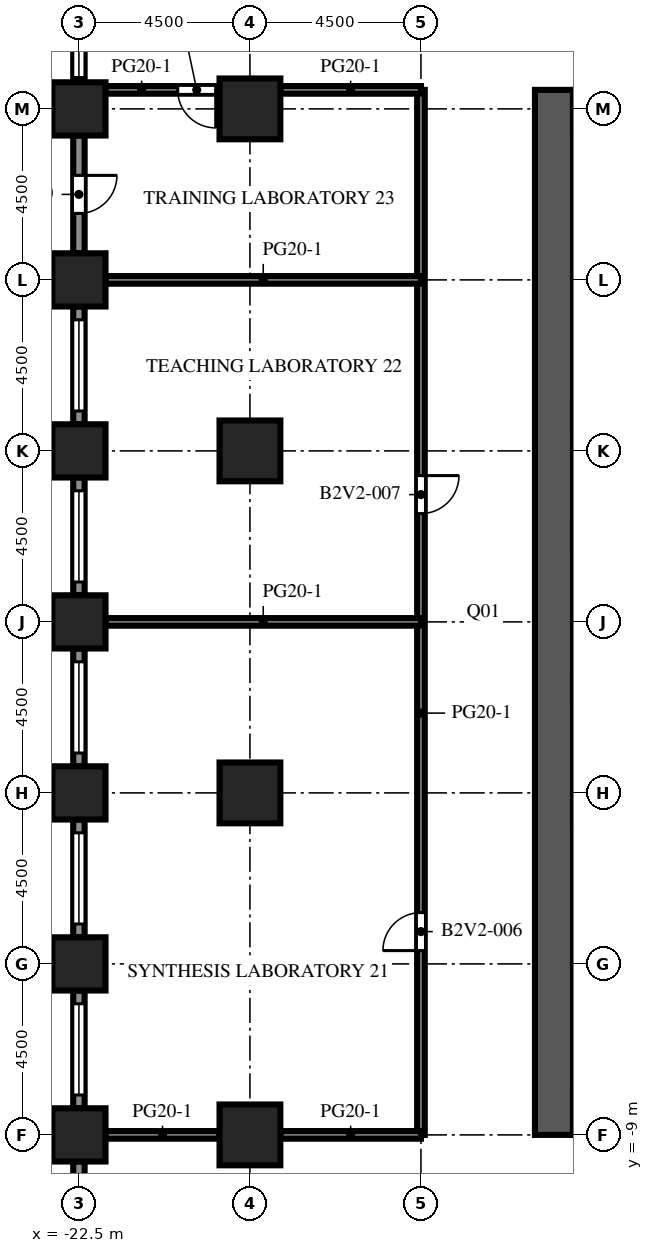
"""IFC4 building model, lengths in metres.
Left out: names, types, materials, properties, quantities, classifications, styles, units other than length and angle.
Written with IfcOpenShell. Run it as: python <this file> out.ifc"""

import sys

from ifc_helpers import new_model, si_unit, direction, frame, frame_2d, origin, origin_2d, place, context, subcontext, project, spatial, rectangle, extrude, element, fill, save


model = new_model("IFC4")
c1 = context("Model", 3, precision=1e-05, world=origin(), true_north=direction((0.0, 1.0)))
c2 = subcontext(c1, "Body", "Model", "MODEL_VIEW")
j1 = project(units=[si_unit("LENGTHUNIT", "METRE"), si_unit("PLANEANGLEUNIT", "RADIAN")], contexts=[c1])
p1 = place(None, origin())
s1 = spatial("IfcSite", under=j1, at=p1, CompositionType="ELEMENT")
p2 = place(p1, origin())
s2 = spatial("IfcBuilding", under=s1, at=p2, CompositionType="ELEMENT")
p3 = place(p2, frame((0.0, 0.0, 62.4)))
s3 = spatial("IfcBuildingStorey", under=s2, at=p3, CompositionType="ELEMENT", Elevation=62.4)
for number, where, z_axis, x_axis in (
    (1, (-22.5, -9.0, 0.0), (0.0, 0.0, 1.0), (1.0, 0.0, 0.0)),
    (2, (-22.5, -4.5, 0.0), (0.0, 0.0, 1.0), (1.0, 0.0, 0.0)),
    (3, (-22.5, 0.0, 0.0), (0.0, 0.0, 1.0), (1.0, 0.0, 0.0)),
    (4, (-22.5, 4.5, 0.0), (0.0, 0.0, 1.0), (1.0, 0.0, 0.0)),
    (5, (-22.5, 9.0, 0.0), (0.0, 0.0, 1.0), (1.0, 0.0, 0.0)),
    (6, (-22.5, 13.5, 0.0), (0.0, 0.0, 1.0), (1.0, 0.0, 0.0)),
    (7, (-22.5, 18.0, 0.0), (0.0, 0.0, 1.0), (1.0, 0.0, 0.0)),
):
    element("IfcColumn", number, at=place(p3, frame(where, z_axis=z_axis, x_axis=x_axis)), inside=s3, PredefinedType="COLUMN", context=c2, shape_type="SweptSolid", body=[
        extrude(rectangle(XDim=1.4, YDim=1.4, at=origin_2d()), origin(), (0.0, 0.0, 1.0), 4.1),
    ])
for number, where, z_axis, x_axis in (
    (8, (-18.0, -9.0, 0.0), (0.0, 0.0, 1.0), (1.0, 0.0, 0.0)),
    (9, (-18.0, 0.0, 0.0), (0.0, 0.0, 1.0), (1.0, 0.0, 0.0)),
    (10, (-18.0, 9.0, 0.0), (0.0, 0.0, 1.0), (1.0, 0.0, 0.0)),
    (11, (-18.0, 18.0, 0.0), (0.0, 0.0, 1.0), (1.0, 0.0, 0.0)),
):
    element("IfcColumn", number, at=place(p3, frame(where, z_axis=z_axis, x_axis=x_axis)), inside=s3, PredefinedType="COLUMN", context=c2, shape_type="SweptSolid", body=[
        extrude(rectangle(XDim=1.6, YDim=1.6, at=origin_2d()), origin(), (0.0, 0.0, 1.0), 4.1),
    ])
p4 = place(p3, frame((-10.0, -9.0, 0.0), z_axis=(0.0, 0.0, 1.0), x_axis=(0.0, 1.0, 0.0)))
e12 = element("IfcWall", 12, at=p4, inside=s3, PredefinedType="SHEAR", context=c2, shape_type="SweptSolid", body=[
    extrude(rectangle(XDim=27.5, YDim=1.0, at=frame_2d((13.75, 0.0))), origin(), (0.0, 0.0, 1.0), 4.1),
])
p5 = place(p4, frame((12.55, 0.0, 0.0)))
e13 = element("IfcOpeningElement", 13, at=p5, cuts=e12, PredefinedType="OPENING", context=c2, shape_type="SweptSolid", body=[
    extrude(rectangle(XDim=2.4, YDim=2.4, at=frame_2d((1.2, 1.2))), frame((0.0, 0.51, 0.0), z_axis=(0.0, -1.0, 0.0), x_axis=(1.0, 0.0, 0.0)), (0.0, 0.0, 1.0), 1.02),
])
p6 = place(p4, frame((6.825, 0.0, 0.0)))
e14 = element("IfcOpeningElement", 14, at=p6, cuts=e12, PredefinedType="OPENING", context=c2, shape_type="SweptSolid", body=[
    extrude(rectangle(XDim=1.2, YDim=2.1, at=frame_2d((0.6, 1.05))), frame((0.0, 0.51, 0.0), z_axis=(0.0, -1.0, 0.0), x_axis=(1.0, 0.0, 0.0)), (0.0, 0.0, 1.0), 1.02),
])
p7 = place(p4, frame((19.475, 0.0, 0.0)))
e15 = element("IfcOpeningElement", 15, at=p7, cuts=e12, PredefinedType="OPENING", context=c2, shape_type="SweptSolid", body=[
    extrude(rectangle(XDim=1.2, YDim=2.1, at=frame_2d((0.6, 1.05))), frame((0.0, 0.51, 0.0), z_axis=(0.0, -1.0, 0.0), x_axis=(1.0, 0.0, 0.0)), (0.0, 0.0, 1.0), 1.02),
])
p8 = place(p3, frame((-22.5, 18.7, 0.0), z_axis=(0.0, 0.0, 1.0), x_axis=(0.0, 1.0, 0.0)))
e16 = element("IfcWall", 16, at=p8, inside=s3, PredefinedType="SOLIDWALL", context=c2, shape_type="SweptSolid", body=[
    extrude(rectangle(XDim=3.1, YDim=0.3, at=frame_2d((1.55, 0.0))), origin(), (0.0, 0.0, 1.0), 2.75),
])
p9 = place(p8, frame((0.125, 0.0, 0.8)))
e17 = element("IfcOpeningElement", 17, at=p9, cuts=e16, PredefinedType="OPENING", context=c2, shape_type="SweptSolid", body=[
    extrude(rectangle(XDim=2.4, YDim=1.7, at=frame_2d((1.2, 0.85))), frame((0.0, 0.16, 0.0), z_axis=(0.0, -1.0, 0.0), x_axis=(1.0, 0.0, 0.0)), (0.0, 0.0, 1.0), 0.32),
])
p10 = place(p3, frame((-22.5, 14.2, 0.0), z_axis=(0.0, 0.0, 1.0), x_axis=(0.0, 1.0, 0.0)))
e18 = element("IfcWall", 18, at=p10, inside=s3, PredefinedType="SOLIDWALL", context=c2, shape_type="SweptSolid", body=[
    extrude(rectangle(XDim=3.1, YDim=0.3, at=frame_2d((1.55, 0.0))), origin(), (0.0, 0.0, 1.0), 2.75),
])
p11 = place(p10, frame((1.05, 0.0, 0.0)))
e19 = element("IfcOpeningElement", 19, at=p11, cuts=e18, PredefinedType="OPENING", context=c2, shape_type="SweptSolid", body=[
    extrude(rectangle(XDim=1.0, YDim=2.2, at=frame_2d((0.5, 1.1))), frame((0.0, 0.16, 0.0), z_axis=(0.0, -1.0, 0.0), x_axis=(1.0, 0.0, 0.0)), (0.0, 0.0, 1.0), 0.32),
])
p12 = place(p3, frame((-22.5, 9.7, 0.0), z_axis=(0.0, 0.0, 1.0), x_axis=(0.0, 1.0, 0.0)))
e20 = element("IfcWall", 20, at=p12, inside=s3, PredefinedType="SOLIDWALL", context=c2, shape_type="SweptSolid", body=[
    extrude(rectangle(XDim=3.1, YDim=0.3, at=frame_2d((1.55, 0.0))), origin(), (0.0, 0.0, 1.0), 2.75),
])
p13 = place(p12, frame((0.35, 0.0, 0.8)))
e21 = element("IfcOpeningElement", 21, at=p13, cuts=e20, PredefinedType="OPENING", context=c2, shape_type="SweptSolid", body=[
    extrude(rectangle(XDim=2.4, YDim=1.7, at=frame_2d((1.2, 0.85))), frame((0.0, 0.16, 0.0), z_axis=(0.0, -1.0, 0.0), x_axis=(1.0, 0.0, 0.0)), (0.0, 0.0, 1.0), 0.32),
])
p14 = place(p3, frame((-22.5, 5.2, 0.0), z_axis=(0.0, 0.0, 1.0), x_axis=(0.0, 1.0, 0.0)))
e22 = element("IfcWall", 22, at=p14, inside=s3, PredefinedType="SOLIDWALL", context=c2, shape_type="SweptSolid", body=[
    extrude(rectangle(XDim=3.1, YDim=0.3, at=frame_2d((1.55, 0.0))), origin(), (0.0, 0.0, 1.0), 2.75),
])
p15 = place(p14, frame((0.35, 0.0, 0.8)))
e23 = element("IfcOpeningElement", 23, at=p15, cuts=e22, PredefinedType="OPENING", context=c2, shape_type="SweptSolid", body=[
    extrude(rectangle(XDim=2.4, YDim=1.7, at=frame_2d((1.2, 0.85))), frame((0.0, 0.16, 0.0), z_axis=(0.0, -1.0, 0.0), x_axis=(1.0, 0.0, 0.0)), (0.0, 0.0, 1.0), 0.32),
])
p16 = place(p3, frame((-22.5, 0.7, 0.0), z_axis=(0.0, 0.0, 1.0), x_axis=(0.0, 1.0, 0.0)))
e24 = element("IfcWall", 24, at=p16, inside=s3, PredefinedType="SOLIDWALL", context=c2, shape_type="SweptSolid", body=[
    extrude(rectangle(XDim=3.1, YDim=0.3, at=frame_2d((1.55, 0.0))), origin(), (0.0, 0.0, 1.0), 2.75),
])
p17 = place(p16, frame((0.35, 0.0, 0.8)))
e25 = element("IfcOpeningElement", 25, at=p17, cuts=e24, PredefinedType="OPENING", context=c2, shape_type="SweptSolid", body=[
    extrude(rectangle(XDim=2.4, YDim=1.7, at=frame_2d((1.2, 0.85))), frame((0.0, 0.16, 0.0), z_axis=(0.0, -1.0, 0.0), x_axis=(1.0, 0.0, 0.0)), (0.0, 0.0, 1.0), 0.32),
])
p18 = place(p3, frame((-22.5, -3.8, 0.0), z_axis=(0.0, 0.0, 1.0), x_axis=(0.0, 1.0, 0.0)))
e26 = element("IfcWall", 26, at=p18, inside=s3, PredefinedType="SOLIDWALL", context=c2, shape_type="SweptSolid", body=[
    extrude(rectangle(XDim=3.1, YDim=0.3, at=frame_2d((1.55, 0.0))), origin(), (0.0, 0.0, 1.0), 2.75),
])
p19 = place(p18, frame((0.35, 0.0, 0.8)))
e27 = element("IfcOpeningElement", 27, at=p19, cuts=e26, PredefinedType="OPENING", context=c2, shape_type="SweptSolid", body=[
    extrude(rectangle(XDim=2.4, YDim=1.7, at=frame_2d((1.2, 0.85))), frame((0.0, 0.16, 0.0), z_axis=(0.0, -1.0, 0.0), x_axis=(1.0, 0.0, 0.0)), (0.0, 0.0, 1.0), 0.32),
])
p20 = place(p3, frame((-22.5, -8.3, 0.0), z_axis=(0.0, 0.0, 1.0), x_axis=(0.0, 1.0, 0.0)))
e28 = element("IfcWall", 28, at=p20, inside=s3, PredefinedType="SOLIDWALL", context=c2, shape_type="SweptSolid", body=[
    extrude(rectangle(XDim=3.1, YDim=0.3, at=frame_2d((1.55, 0.0))), origin(), (0.0, 0.0, 1.0), 2.75),
])
p21 = place(p20, frame((0.35, 0.0, 0.8)))
e29 = element("IfcOpeningElement", 29, at=p21, cuts=e28, PredefinedType="OPENING", context=c2, shape_type="SweptSolid", body=[
    extrude(rectangle(XDim=2.4, YDim=1.7, at=frame_2d((1.2, 0.85))), frame((0.0, 0.16, 0.0), z_axis=(0.0, -1.0, 0.0), x_axis=(1.0, 0.0, 0.0)), (0.0, 0.0, 1.0), 0.32),
])
p22 = place(p3, frame((-22.5, -12.8, 0.0), z_axis=(0.0, 0.0, 1.0), x_axis=(0.0, 1.0, 0.0)))
e30 = element("IfcWall", 30, at=p22, inside=s3, PredefinedType="SOLIDWALL", context=c2, shape_type="SweptSolid", body=[
    extrude(rectangle(XDim=3.1, YDim=0.3, at=frame_2d((1.55, 0.0))), origin(), (0.0, 0.0, 1.0), 2.75),
])
p23 = place(p22, frame((1.425, 0.0, 0.8)))
e31 = element("IfcOpeningElement", 31, at=p23, cuts=e30, PredefinedType="OPENING", context=c2, shape_type="SweptSolid", body=[
    extrude(rectangle(XDim=1.2, YDim=1.7, at=frame_2d((0.6, 0.85))), frame((0.0, 0.16, 0.0), z_axis=(0.0, -1.0, 0.0), x_axis=(1.0, 0.0, 0.0)), (0.0, 0.0, 1.0), 0.32),
])
p24 = place(p3, frame((-13.5, -9.0, 0.0), z_axis=(0.0, 0.0, 1.0), x_axis=(0.0, 1.0, 0.0)))
e32 = element("IfcWall", 32, at=p24, inside=s3, PredefinedType="PARTITIONING", context=c2, shape_type="SweptSolid", body=[
    extrude(rectangle(XDim=27.5, YDim=0.2, at=frame_2d((13.75, 0.0))), origin(), (0.0, 0.0, 1.0), 3.65),
])
p25 = place(p24, frame((4.85, 0.0, 0.0)))
e33 = element("IfcOpeningElement", 33, at=p25, cuts=e32, PredefinedType="OPENING", context=c2, shape_type="SweptSolid", body=[
    extrude(rectangle(XDim=1.0, YDim=2.1, at=frame_2d((0.5, 1.05))), frame((0.0, 0.11, 0.0), z_axis=(0.0, -1.0, 0.0), x_axis=(1.0, 0.0, 0.0)), (0.0, 0.0, 1.0), 0.22),
])
p26 = place(p24, frame((16.35, 0.0, 0.0)))
e34 = element("IfcOpeningElement", 34, at=p26, cuts=e32, PredefinedType="OPENING", context=c2, shape_type="SweptSolid", body=[
    extrude(rectangle(XDim=1.0, YDim=2.1, at=frame_2d((0.5, 1.05))), frame((0.0, 0.11, 0.0), z_axis=(0.0, -1.0, 0.0), x_axis=(1.0, 0.0, 0.0)), (0.0, 0.0, 1.0), 0.22),
])
p27 = place(p3, frame((-21.8, -9.0, 0.0), z_axis=(0.0, 0.0, 1.0), x_axis=(1.0, 0.0, 0.0)))
e35 = element("IfcWall", 35, at=p27, inside=s3, PredefinedType="PARTITIONING", context=c2, shape_type="SweptSolid", body=[
    extrude(rectangle(XDim=3.0, YDim=0.2, at=frame_2d((1.5, 0.0))), origin(), (0.0, 0.0, 1.0), 3.65),
])
p28 = place(p3, frame((-17.2, -9.0, 0.0), z_axis=(0.0, 0.0, 1.0), x_axis=(1.0, 0.0, 0.0)))
e36 = element("IfcWall", 36, at=p28, inside=s3, PredefinedType="PARTITIONING", context=c2, shape_type="SweptSolid", body=[
    extrude(rectangle(XDim=3.7, YDim=0.2, at=frame_2d((1.85, 0.0))), origin(), (0.0, 0.0, 1.0), 3.65),
])
for number, where, z_axis, x_axis in (
    (37, (-21.8, 4.5, 0.0), (0.0, 0.0, 1.0), (1.0, 0.0, 0.0)),
    (38, (-21.8, 13.5, 0.0), (0.0, 0.0, 1.0), (1.0, 0.0, 0.0)),
):
    element("IfcWall", number, at=place(p3, frame(where, z_axis=z_axis, x_axis=x_axis)), inside=s3, PredefinedType="PARTITIONING", context=c2, shape_type="SweptSolid", body=[
        extrude(rectangle(XDim=8.3, YDim=0.2, at=frame_2d((4.15, 0.0))), origin(), (0.0, 0.0, 1.0), 3.65),
    ])
p29 = place(p3, frame((-18.8, 18.5, 0.0), z_axis=(0.0, 0.0, 1.0), x_axis=(-1.0, 0.0, 0.0)))
e39 = element("IfcWall", 39, at=p29, inside=s3, PredefinedType="PARTITIONING", context=c2, shape_type="SweptSolid", body=[
    extrude(rectangle(XDim=3.0, YDim=0.2, at=frame_2d((1.5, 0.0))), origin(), (0.0, 0.0, 1.0), 3.65),
])
p30 = place(p29, frame((0.1, 0.0, 0.0)))
e40 = element("IfcOpeningElement", 40, at=p30, cuts=e39, PredefinedType="OPENING", context=c2, shape_type="SweptSolid", body=[
    extrude(rectangle(XDim=1.0, YDim=2.1, at=frame_2d((0.5, 1.05))), frame((0.0, 0.11, 0.0), z_axis=(0.0, -1.0, 0.0), x_axis=(1.0, 0.0, 0.0)), (0.0, 0.0, 1.0), 0.22),
])
p31 = place(p3, frame((-17.2, 18.5, 0.0), z_axis=(0.0, 0.0, 1.0), x_axis=(1.0, 0.0, 0.0)))
e41 = element("IfcWall", 41, at=p31, inside=s3, PredefinedType="PARTITIONING", context=c2, shape_type="SweptSolid", body=[
    extrude(rectangle(XDim=3.7, YDim=0.2, at=frame_2d((1.85, 0.0))), origin(), (0.0, 0.0, 1.0), 3.65),
])
p32 = place(p9, origin())
e42 = element("IfcWindow", 42, at=p32, inside=s3, PartitioningType="SINGLE_PANEL", PredefinedType="WINDOW", context=c2, shape_type="SweptSolid", body=[
    extrude(rectangle(XDim=2.4, YDim=1.7, at=frame_2d((1.2, 0.85))), frame((0.0, 0.03, 0.0), z_axis=(0.0, -1.0, 0.0), x_axis=(1.0, 0.0, 0.0)), (0.0, 0.0, 1.0), 0.06),
])
fill(e17, e42)
p33 = place(p11, origin())
e43 = element("IfcDoor", 43, at=p33, inside=s3, OperationType="SINGLE_SWING_RIGHT", PredefinedType="DOOR", context=c2, shape_type="SweptSolid", body=[
    extrude(rectangle(XDim=1.0, YDim=2.2, at=frame_2d((0.5, 1.1))), frame((0.0, 0.025, 0.0), z_axis=(0.0, -1.0, 0.0), x_axis=(1.0, 0.0, 0.0)), (0.0, 0.0, 1.0), 0.05),
])
fill(e19, e43)
p34 = place(p13, origin())
e44 = element("IfcWindow", 44, at=p34, inside=s3, PartitioningType="SINGLE_PANEL", PredefinedType="WINDOW", context=c2, shape_type="SweptSolid", body=[
    extrude(rectangle(XDim=2.4, YDim=1.7, at=frame_2d((1.2, 0.85))), frame((0.0, 0.03, 0.0), z_axis=(0.0, -1.0, 0.0), x_axis=(1.0, 0.0, 0.0)), (0.0, 0.0, 1.0), 0.06),
])
fill(e21, e44)
p35 = place(p15, origin())
e45 = element("IfcWindow", 45, at=p35, inside=s3, PartitioningType="SINGLE_PANEL", PredefinedType="WINDOW", context=c2, shape_type="SweptSolid", body=[
    extrude(rectangle(XDim=2.4, YDim=1.7, at=frame_2d((1.2, 0.85))), frame((0.0, 0.03, 0.0), z_axis=(0.0, -1.0, 0.0), x_axis=(1.0, 0.0, 0.0)), (0.0, 0.0, 1.0), 0.06),
])
fill(e23, e45)
p36 = place(p17, origin())
e46 = element("IfcWindow", 46, at=p36, inside=s3, PartitioningType="SINGLE_PANEL", PredefinedType="WINDOW", context=c2, shape_type="SweptSolid", body=[
    extrude(rectangle(XDim=2.4, YDim=1.7, at=frame_2d((1.2, 0.85))), frame((0.0, 0.03, 0.0), z_axis=(0.0, -1.0, 0.0), x_axis=(1.0, 0.0, 0.0)), (0.0, 0.0, 1.0), 0.06),
])
fill(e25, e46)
p37 = place(p19, origin())
e47 = element("IfcWindow", 47, at=p37, inside=s3, PartitioningType="SINGLE_PANEL", PredefinedType="WINDOW", context=c2, shape_type="SweptSolid", body=[
    extrude(rectangle(XDim=2.4, YDim=1.7, at=frame_2d((1.2, 0.85))), frame((0.0, 0.03, 0.0), z_axis=(0.0, -1.0, 0.0), x_axis=(1.0, 0.0, 0.0)), (0.0, 0.0, 1.0), 0.06),
])
fill(e27, e47)
p38 = place(p21, origin())
e48 = element("IfcWindow", 48, at=p38, inside=s3, PartitioningType="SINGLE_PANEL", PredefinedType="WINDOW", context=c2, shape_type="SweptSolid", body=[
    extrude(rectangle(XDim=2.4, YDim=1.7, at=frame_2d((1.2, 0.85))), frame((0.0, 0.03, 0.0), z_axis=(0.0, -1.0, 0.0), x_axis=(1.0, 0.0, 0.0)), (0.0, 0.0, 1.0), 0.06),
])
fill(e29, e48)
p39 = place(p5, origin())
e49 = element("IfcDoor", 49, at=p39, inside=s3, OperationType="DOUBLE_DOOR_DOUBLE_SWING", PredefinedType="DOOR", context=c2, shape_type="SweptSolid", body=[
    extrude(rectangle(XDim=2.4, YDim=2.4, at=frame_2d((1.2, 1.2))), frame((0.0, 0.025, 0.0), z_axis=(0.0, -1.0, 0.0), x_axis=(1.0, 0.0, 0.0)), (0.0, 0.0, 1.0), 0.05),
])
fill(e13, e49)
p40 = place(p6, origin())
e50 = element("IfcDoor", 50, at=p40, inside=s3, OperationType="SINGLE_SWING_LEFT", PredefinedType="DOOR", context=c2, shape_type="SweptSolid", body=[
    extrude(rectangle(XDim=1.2, YDim=2.1, at=frame_2d((0.6, 1.05))), frame((0.0, 0.025, 0.0), z_axis=(0.0, -1.0, 0.0), x_axis=(1.0, 0.0, 0.0)), (0.0, 0.0, 1.0), 0.05),
])
fill(e14, e50)
p41 = place(p7, origin())
e51 = element("IfcDoor", 51, at=p41, inside=s3, OperationType="SINGLE_SWING_LEFT", PredefinedType="DOOR", context=c2, shape_type="SweptSolid", body=[
    extrude(rectangle(XDim=1.2, YDim=2.1, at=frame_2d((0.6, 1.05))), frame((0.0, 0.025, 0.0), z_axis=(0.0, -1.0, 0.0), x_axis=(1.0, 0.0, 0.0)), (0.0, 0.0, 1.0), 0.05),
])
fill(e15, e51)
p42 = place(p25, origin())
e52 = element("IfcDoor", 52, at=p42, inside=s3, OperationType="SINGLE_SWING_LEFT", PredefinedType="DOOR", context=c2, shape_type="SweptSolid", body=[
    extrude(rectangle(XDim=1.0, YDim=2.1, at=frame_2d((0.5, 1.05))), frame((0.0, 0.025, 0.0), z_axis=(0.0, -1.0, 0.0), x_axis=(1.0, 0.0, 0.0)), (0.0, 0.0, 1.0), 0.05),
])
fill(e33, e52)
p43 = place(p26, origin())
e53 = element("IfcDoor", 53, at=p43, inside=s3, OperationType="SINGLE_SWING_RIGHT", PredefinedType="DOOR", context=c2, shape_type="SweptSolid", body=[
    extrude(rectangle(XDim=1.0, YDim=2.1, at=frame_2d((0.5, 1.05))), frame((0.0, 0.025, 0.0), z_axis=(0.0, -1.0, 0.0), x_axis=(1.0, 0.0, 0.0)), (0.0, 0.0, 1.0), 0.05),
])
fill(e34, e53)
p44 = place(p30, origin())
e54 = element("IfcDoor", 54, at=p44, inside=s3, OperationType="SINGLE_SWING_LEFT", PredefinedType="DOOR", context=c2, shape_type="SweptSolid", body=[
    extrude(rectangle(XDim=1.0, YDim=2.1, at=frame_2d((0.5, 1.05))), frame((0.0, 0.025, 0.0), z_axis=(0.0, -1.0, 0.0), x_axis=(1.0, 0.0, 0.0)), (0.0, 0.0, 1.0), 0.05),
])
fill(e40, e54)
save(model, sys.argv[1])
